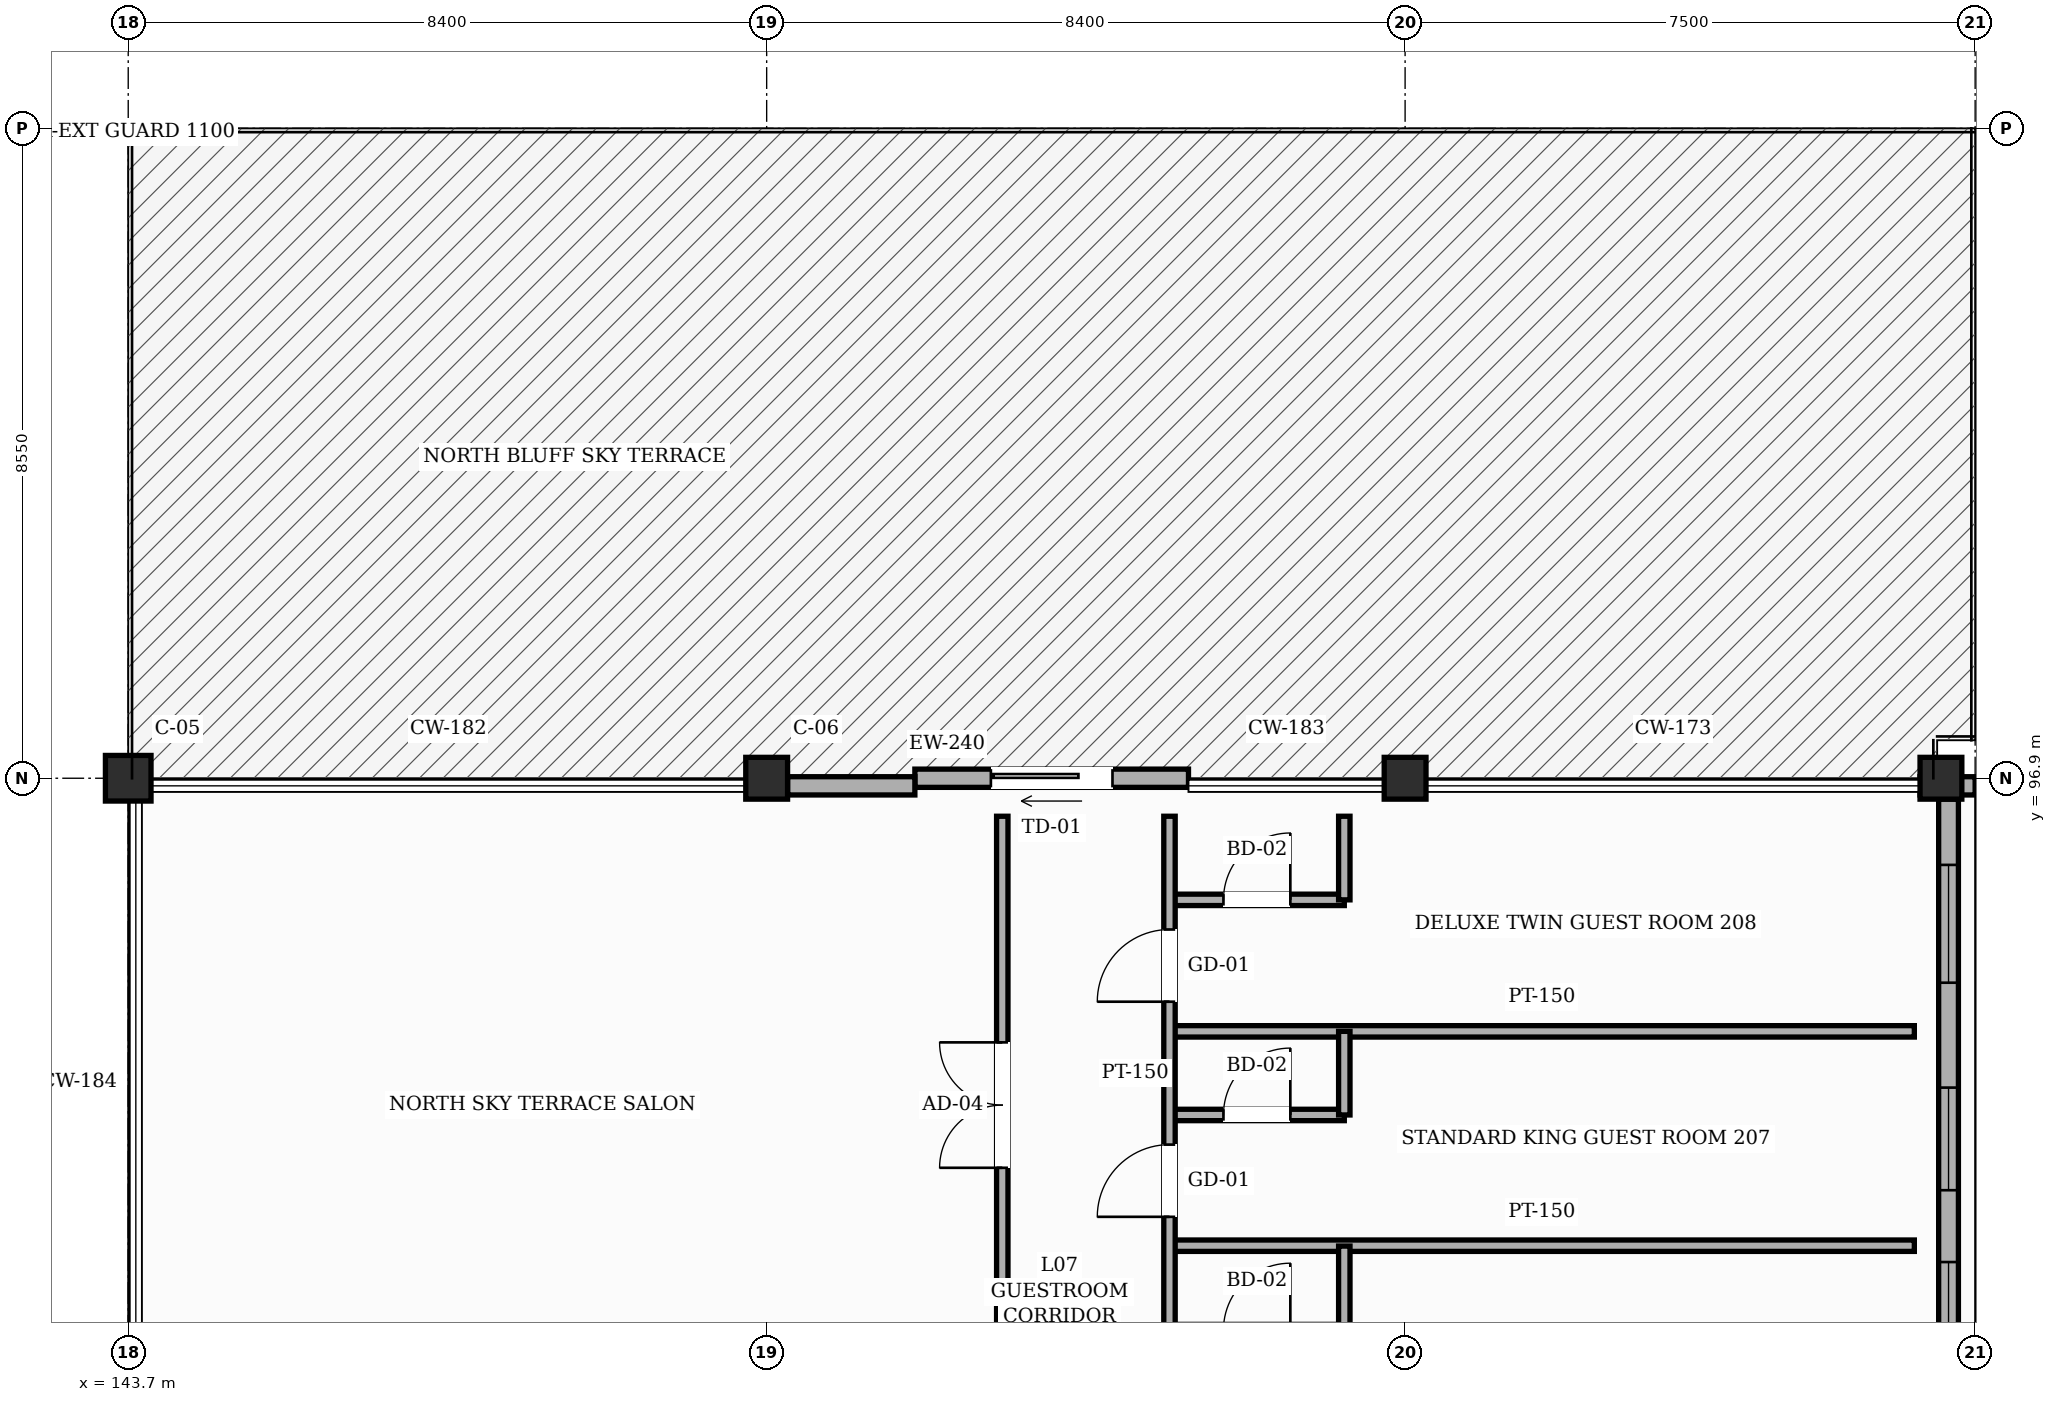
"""IFC4 building model, lengths in metres.
Left out: names, types, materials, properties, quantities, classifications, styles, units other than length and angle.
Written with IfcOpenShell. Run it as: python <this file> out.ifc"""

import sys

from ifc_helpers import new_model, si_unit, direction, frame, frame_2d, origin, origin_2d, place, context, subcontext, project, spatial, rectangle, hollow_rectangle, extrude, element, fill, save


model = new_model("IFC4")
c1 = context("Model", 3, precision=1e-05, world=origin(), true_north=direction((0.0, 1.0)))
c2 = subcontext(c1, "Body", "Model", "MODEL_VIEW")
j1 = project(units=[si_unit("LENGTHUNIT", "METRE"), si_unit("PLANEANGLEUNIT", "RADIAN")], contexts=[c1])
p1 = place(None, origin())
s1 = spatial("IfcSite", under=j1, at=p1, CompositionType="ELEMENT")
p2 = place(p1, origin())
s2 = spatial("IfcBuilding", under=s1, at=p2, CompositionType="ELEMENT")
p3 = place(p2, frame((0.0, 0.0, 31.8)))
s3 = spatial("IfcBuildingStorey", under=s2, at=p3, CompositionType="ELEMENT", Elevation=31.8)
p4 = place(p3, frame((143.7, 96.9, 0.0), z_axis=(0.0, 0.0, 1.0), x_axis=(1.0, 0.0, 0.0)))
e1 = element("IfcColumn", 1, at=p4, inside=s3, PredefinedType="COLUMN", context=c2, shape_type="SweptSolid", body=[
    extrude(hollow_rectangle(XDim=0.6, YDim=0.6, WallThickness=0.025, InnerFilletRadius=0.025, OuterFilletRadius=0.05, at=origin_2d()), origin(), (0.0, 0.0, 1.0), 3.6),
])
for number, where, z_axis, x_axis in (
    (2, (152.1, 96.9, 0.0), (0.0, 0.0, 1.0), (1.0, 0.0, 0.0)),
    (3, (160.5, 96.9, 0.0), (0.0, 0.0, 1.0), (1.0, 0.0, 0.0)),
    (4, (167.55, 96.9, 0.0), (0.0, 0.0, 1.0), (1.0, 0.0, 0.0)),
):
    element("IfcColumn", number, at=place(p3, frame(where, z_axis=z_axis, x_axis=x_axis)), inside=s3, PredefinedType="COLUMN", context=c2, shape_type="SweptSolid", body=[
        extrude(hollow_rectangle(XDim=0.55, YDim=0.55, WallThickness=0.022, InnerFilletRadius=0.022, OuterFilletRadius=0.044, at=origin_2d()), origin(), (0.0, 0.0, 1.0), 3.6),
    ])
p5 = place(p3, frame((167.65, 96.625, 0.0), z_axis=(0.0, 0.0, 1.0), x_axis=(0.0, -1.0, 0.0)))
e5 = element("IfcWall", 5, at=p5, inside=s3, PredefinedType="SOLIDWALL", context=c2, shape_type="SweptSolid", body=[
    extrude(rectangle(XDim=7.45, YDim=0.26, at=frame_2d((3.725, 0.0))), origin(), (0.0, 0.0, 1.0), 2.755),
])
p6 = place(p5, frame((6.09, 0.0, 0.85)))
e6 = element("IfcOpeningElement", 6, at=p6, cuts=e5, PredefinedType="OPENING", context=c2, shape_type="SweptSolid", body=[
    extrude(rectangle(XDim=1.15, YDim=1.35, at=frame_2d((0.575, 0.675))), frame((0.0, 0.14, 0.0), z_axis=(0.0, -1.0, 0.0), x_axis=(1.0, 0.0, 0.0)), (0.0, 0.0, 1.0), 0.28),
])
p7 = place(p5, frame((3.795, 0.0, 0.85)))
e7 = element("IfcOpeningElement", 7, at=p7, cuts=e5, PredefinedType="OPENING", context=c2, shape_type="SweptSolid", body=[
    extrude(rectangle(XDim=1.35, YDim=1.35, at=frame_2d((0.675, 0.675))), frame((0.0, 0.14, 0.0), z_axis=(0.0, -1.0, 0.0), x_axis=(1.0, 0.0, 0.0)), (0.0, 0.0, 1.0), 0.28),
])
p8 = place(p5, frame((0.865, 0.0, 0.85)))
e8 = element("IfcOpeningElement", 8, at=p8, cuts=e5, PredefinedType="OPENING", context=c2, shape_type="SweptSolid", body=[
    extrude(rectangle(XDim=1.55, YDim=1.35, at=frame_2d((0.775, 0.675))), frame((0.0, 0.14, 0.0), z_axis=(0.0, -1.0, 0.0), x_axis=(1.0, 0.0, 0.0)), (0.0, 0.0, 1.0), 0.28),
])
p9 = place(p3, frame((154.05, 96.9, 0.0), z_axis=(0.0, 0.0, 1.0), x_axis=(1.0, 0.0, 0.0)))
e9 = element("IfcWall", 9, at=p9, inside=s3, PredefinedType="SOLIDWALL", context=c2, shape_type="SweptSolid", body=[
    extrude(rectangle(XDim=3.6, YDim=0.24, at=frame_2d((1.8, 0.0))), origin(), (0.0, 0.0, 1.0), 2.755),
])
p10 = place(p9, frame((1.0, 0.0, 0.0)))
e10 = element("IfcOpeningElement", 10, at=p10, cuts=e9, PredefinedType="OPENING", context=c2, shape_type="SweptSolid", body=[
    extrude(rectangle(XDim=1.6, YDim=2.3, at=frame_2d((0.8, 1.15))), frame((0.0, 0.13, 0.0), z_axis=(0.0, -1.0, 0.0), x_axis=(1.0, 0.0, 0.0)), (0.0, 0.0, 1.0), 0.26),
])
p11 = place(p3, frame((152.375, 96.8, 0.0), z_axis=(0.0, 0.0, 1.0), x_axis=(1.0, 0.0, 0.0)))
e11 = element("IfcWall", 11, at=p11, inside=s3, PredefinedType="SOLIDWALL", context=c2, shape_type="SweptSolid", body=[
    extrude(rectangle(XDim=1.675, YDim=0.24, at=frame_2d((0.837, 0.0))), origin(), (0.0, 0.0, 1.0), 2.755),
])
p12 = place(p3, frame((167.275, 96.8, 0.0), z_axis=(0.0, 0.0, 1.0), x_axis=(1.0, 0.0, 0.0)))
e12 = element("IfcWall", 12, at=p12, inside=s3, PredefinedType="SOLIDWALL", context=c2, shape_type="SweptSolid", body=[
    extrude(rectangle(XDim=0.725, YDim=0.24, at=frame_2d((0.363, 0.0))), origin(), (0.0, 0.0, 1.0), 3.365),
])
p13 = place(p3, frame((157.4, 90.75, 0.0), z_axis=(0.0, 0.0, 1.0), x_axis=(1.0, 0.0, 0.0)))
e13 = element("IfcWall", 13, at=p13, inside=s3, PredefinedType="PARTITIONING", context=c2, shape_type="SweptSolid", body=[
    extrude(rectangle(XDim=9.8, YDim=0.15, at=frame_2d((4.9, 0.0))), origin(), (0.0, 0.0, 1.0), 3.365),
])
p14 = place(p3, frame((157.4, 92.47, 0.0), z_axis=(0.0, 0.0, 1.0), x_axis=(1.0, 0.0, 0.0)))
e14 = element("IfcWall", 14, at=p14, inside=s3, PredefinedType="PARTITIONING", context=c2, shape_type="SweptSolid", body=[
    extrude(rectangle(XDim=2.3, YDim=0.15, at=frame_2d((1.15, 0.0))), origin(), (0.0, 0.0, 1.0), 3.365),
])
p15 = place(p14, frame((0.71, 0.0, 0.0)))
e15 = element("IfcOpeningElement", 15, at=p15, cuts=e14, PredefinedType="OPENING", context=c2, shape_type="SweptSolid", body=[
    extrude(rectangle(XDim=0.88, YDim=2.12, at=frame_2d((0.44, 1.06))), frame((0.0, 0.085, 0.0), z_axis=(0.0, -1.0, 0.0), x_axis=(1.0, 0.0, 0.0)), (0.0, 0.0, 1.0), 0.17),
])
p16 = place(p3, frame((157.4, 93.57, 0.0), z_axis=(0.0, 0.0, 1.0), x_axis=(1.0, 0.0, 0.0)))
e16 = element("IfcWall", 16, at=p16, inside=s3, PredefinedType="PARTITIONING", context=c2, shape_type="SweptSolid", body=[
    extrude(rectangle(XDim=9.8, YDim=0.15, at=frame_2d((4.9, 0.0))), origin(), (0.0, 0.0, 1.0), 3.365),
])
p17 = place(p3, frame((157.4, 95.3, 0.0), z_axis=(0.0, 0.0, 1.0), x_axis=(1.0, 0.0, 0.0)))
e17 = element("IfcWall", 17, at=p17, inside=s3, PredefinedType="PARTITIONING", context=c2, shape_type="SweptSolid", body=[
    extrude(rectangle(XDim=2.3, YDim=0.15, at=frame_2d((1.15, 0.0))), origin(), (0.0, 0.0, 1.0), 3.365),
])
p18 = place(p17, frame((0.71, 0.0, 0.0)))
e18 = element("IfcOpeningElement", 18, at=p18, cuts=e17, PredefinedType="OPENING", context=c2, shape_type="SweptSolid", body=[
    extrude(rectangle(XDim=0.88, YDim=2.12, at=frame_2d((0.44, 1.06))), frame((0.0, 0.085, 0.0), z_axis=(0.0, -1.0, 0.0), x_axis=(1.0, 0.0, 0.0)), (0.0, 0.0, 1.0), 0.17),
])
p19 = place(p3, frame((155.2, 62.0, 0.0), z_axis=(0.0, 0.0, 1.0), x_axis=(0.0, 1.0, 0.0)))
e19 = element("IfcWall", 19, at=p19, inside=s3, PredefinedType="PARTITIONING", context=c2, shape_type="SweptSolid", body=[
    extrude(rectangle(XDim=34.4, YDim=0.15, at=frame_2d((17.2, 0.0))), origin(), (0.0, 0.0, 1.0), 3.365),
])
p20 = place(p19, frame((29.775, 0.0, 0.0)))
e20 = element("IfcOpeningElement", 20, at=p20, cuts=e19, PredefinedType="OPENING", context=c2, shape_type="SweptSolid", body=[
    extrude(rectangle(XDim=1.65, YDim=2.35, at=frame_2d((0.825, 1.175))), frame((0.0, 0.085, 0.0), z_axis=(0.0, -1.0, 0.0), x_axis=(1.0, 0.0, 0.0)), (0.0, 0.0, 1.0), 0.17),
])
p21 = place(p19, frame((0.4, 0.0, 0.0)))
e21 = element("IfcOpeningElement", 21, at=p21, cuts=e19, PredefinedType="OPENING", context=c2, shape_type="SweptSolid", body=[
    extrude(rectangle(XDim=0.95, YDim=2.15, at=frame_2d((0.475, 1.075))), frame((0.0, 0.085, 0.0), z_axis=(0.0, -1.0, 0.0), x_axis=(1.0, 0.0, 0.0)), (0.0, 0.0, 1.0), 0.17),
])
p22 = place(p19, frame((3.38, 0.0, 0.0)))
e22 = element("IfcOpeningElement", 22, at=p22, cuts=e19, PredefinedType="OPENING", context=c2, shape_type="SweptSolid", body=[
    extrude(rectangle(XDim=0.95, YDim=2.15, at=frame_2d((0.475, 1.075))), frame((0.0, 0.085, 0.0), z_axis=(0.0, -1.0, 0.0), x_axis=(1.0, 0.0, 0.0)), (0.0, 0.0, 1.0), 0.17),
])
p23 = place(p19, frame((6.355, 0.0, 0.0)))
e23 = element("IfcOpeningElement", 23, at=p23, cuts=e19, PredefinedType="OPENING", context=c2, shape_type="SweptSolid", body=[
    extrude(rectangle(XDim=0.95, YDim=2.15, at=frame_2d((0.475, 1.075))), frame((0.0, 0.085, 0.0), z_axis=(0.0, -1.0, 0.0), x_axis=(1.0, 0.0, 0.0)), (0.0, 0.0, 1.0), 0.17),
])
p24 = place(p19, frame((9.335, 0.0, 0.0)))
e24 = element("IfcOpeningElement", 24, at=p24, cuts=e19, PredefinedType="OPENING", context=c2, shape_type="SweptSolid", body=[
    extrude(rectangle(XDim=0.95, YDim=2.15, at=frame_2d((0.475, 1.075))), frame((0.0, 0.085, 0.0), z_axis=(0.0, -1.0, 0.0), x_axis=(1.0, 0.0, 0.0)), (0.0, 0.0, 1.0), 0.17),
])
p25 = place(p19, frame((12.31, 0.0, 0.0)))
e25 = element("IfcOpeningElement", 25, at=p25, cuts=e19, PredefinedType="OPENING", context=c2, shape_type="SweptSolid", body=[
    extrude(rectangle(XDim=0.95, YDim=2.15, at=frame_2d((0.475, 1.075))), frame((0.0, 0.085, 0.0), z_axis=(0.0, -1.0, 0.0), x_axis=(1.0, 0.0, 0.0)), (0.0, 0.0, 1.0), 0.17),
])
p26 = place(p19, frame((15.29, 0.0, 0.0)))
e26 = element("IfcOpeningElement", 26, at=p26, cuts=e19, PredefinedType="OPENING", context=c2, shape_type="SweptSolid", body=[
    extrude(rectangle(XDim=0.95, YDim=2.15, at=frame_2d((0.475, 1.075))), frame((0.0, 0.085, 0.0), z_axis=(0.0, -1.0, 0.0), x_axis=(1.0, 0.0, 0.0)), (0.0, 0.0, 1.0), 0.17),
])
p27 = place(p19, frame((18.265, 0.0, 0.0)))
e27 = element("IfcOpeningElement", 27, at=p27, cuts=e19, PredefinedType="OPENING", context=c2, shape_type="SweptSolid", body=[
    extrude(rectangle(XDim=0.95, YDim=2.15, at=frame_2d((0.475, 1.075))), frame((0.0, 0.085, 0.0), z_axis=(0.0, -1.0, 0.0), x_axis=(1.0, 0.0, 0.0)), (0.0, 0.0, 1.0), 0.17),
])
p28 = place(p19, frame((21.245, 0.0, 0.0)))
e28 = element("IfcOpeningElement", 28, at=p28, cuts=e19, PredefinedType="OPENING", context=c2, shape_type="SweptSolid", body=[
    extrude(rectangle(XDim=0.95, YDim=2.15, at=frame_2d((0.475, 1.075))), frame((0.0, 0.085, 0.0), z_axis=(0.0, -1.0, 0.0), x_axis=(1.0, 0.0, 0.0)), (0.0, 0.0, 1.0), 0.17),
])
p29 = place(p19, frame((24.22, 0.0, 0.0)))
e29 = element("IfcOpeningElement", 29, at=p29, cuts=e19, PredefinedType="OPENING", context=c2, shape_type="SweptSolid", body=[
    extrude(rectangle(XDim=0.95, YDim=2.15, at=frame_2d((0.475, 1.075))), frame((0.0, 0.085, 0.0), z_axis=(0.0, -1.0, 0.0), x_axis=(1.0, 0.0, 0.0)), (0.0, 0.0, 1.0), 0.17),
])
p30 = place(p3, frame((157.4, 76.6, 0.0), z_axis=(0.0, 0.0, 1.0), x_axis=(0.0, 1.0, 0.0)))
e30 = element("IfcWall", 30, at=p30, inside=s3, PredefinedType="PARTITIONING", context=c2, shape_type="SweptSolid", body=[
    extrude(rectangle(XDim=19.8, YDim=0.15, at=frame_2d((9.9, 0.0))), origin(), (0.0, 0.0, 1.0), 3.365),
])
p31 = place(p30, frame((0.39, 0.0, 0.0)))
e31 = element("IfcOpeningElement", 31, at=p31, cuts=e30, PredefinedType="OPENING", context=c2, shape_type="SweptSolid", body=[
    extrude(rectangle(XDim=0.95, YDim=2.15, at=frame_2d((0.475, 1.075))), frame((0.0, 0.085, 0.0), z_axis=(0.0, -1.0, 0.0), x_axis=(1.0, 0.0, 0.0)), (0.0, 0.0, 1.0), 0.17),
])
p32 = place(p30, frame((3.22, 0.0, 0.0)))
e32 = element("IfcOpeningElement", 32, at=p32, cuts=e30, PredefinedType="OPENING", context=c2, shape_type="SweptSolid", body=[
    extrude(rectangle(XDim=0.95, YDim=2.15, at=frame_2d((0.475, 1.075))), frame((0.0, 0.085, 0.0), z_axis=(0.0, -1.0, 0.0), x_axis=(1.0, 0.0, 0.0)), (0.0, 0.0, 1.0), 0.17),
])
p33 = place(p30, frame((6.045, 0.0, 0.0)))
e33 = element("IfcOpeningElement", 33, at=p33, cuts=e30, PredefinedType="OPENING", context=c2, shape_type="SweptSolid", body=[
    extrude(rectangle(XDim=0.95, YDim=2.15, at=frame_2d((0.475, 1.075))), frame((0.0, 0.085, 0.0), z_axis=(0.0, -1.0, 0.0), x_axis=(1.0, 0.0, 0.0)), (0.0, 0.0, 1.0), 0.17),
])
p34 = place(p30, frame((8.875, 0.0, 0.0)))
e34 = element("IfcOpeningElement", 34, at=p34, cuts=e30, PredefinedType="OPENING", context=c2, shape_type="SweptSolid", body=[
    extrude(rectangle(XDim=0.95, YDim=2.15, at=frame_2d((0.475, 1.075))), frame((0.0, 0.085, 0.0), z_axis=(0.0, -1.0, 0.0), x_axis=(1.0, 0.0, 0.0)), (0.0, 0.0, 1.0), 0.17),
])
p35 = place(p30, frame((11.705, 0.0, 0.0)))
e35 = element("IfcOpeningElement", 35, at=p35, cuts=e30, PredefinedType="OPENING", context=c2, shape_type="SweptSolid", body=[
    extrude(rectangle(XDim=0.95, YDim=2.15, at=frame_2d((0.475, 1.075))), frame((0.0, 0.085, 0.0), z_axis=(0.0, -1.0, 0.0), x_axis=(1.0, 0.0, 0.0)), (0.0, 0.0, 1.0), 0.17),
])
p36 = place(p30, frame((14.53, 0.0, 0.0)))
e36 = element("IfcOpeningElement", 36, at=p36, cuts=e30, PredefinedType="OPENING", context=c2, shape_type="SweptSolid", body=[
    extrude(rectangle(XDim=0.95, YDim=2.15, at=frame_2d((0.475, 1.075))), frame((0.0, 0.085, 0.0), z_axis=(0.0, -1.0, 0.0), x_axis=(1.0, 0.0, 0.0)), (0.0, 0.0, 1.0), 0.17),
])
p37 = place(p30, frame((17.36, 0.0, 0.0)))
e37 = element("IfcOpeningElement", 37, at=p37, cuts=e30, PredefinedType="OPENING", context=c2, shape_type="SweptSolid", body=[
    extrude(rectangle(XDim=0.95, YDim=2.15, at=frame_2d((0.475, 1.075))), frame((0.0, 0.085, 0.0), z_axis=(0.0, -1.0, 0.0), x_axis=(1.0, 0.0, 0.0)), (0.0, 0.0, 1.0), 0.17),
])
for number, where, z_axis, x_axis in (
    (38, (159.7, 89.645, 0.0), (0.0, 0.0, 1.0), (0.0, 1.0, 0.0)),
    (39, (159.7, 92.47, 0.0), (0.0, 0.0, 1.0), (0.0, 1.0, 0.0)),
):
    element("IfcWall", number, at=place(p3, frame(where, z_axis=z_axis, x_axis=x_axis)), inside=s3, PredefinedType="PARTITIONING", context=c2, shape_type="SweptSolid", body=[
        extrude(rectangle(XDim=1.1, YDim=0.15, at=frame_2d((0.55, 0.0))), origin(), (0.0, 0.0, 1.0), 3.365),
    ])
p38 = place(p3, frame((159.7, 95.3, 0.0), z_axis=(0.0, 0.0, 1.0), x_axis=(0.0, 1.0, 0.0)))
e40 = element("IfcWall", 40, at=p38, inside=s3, PredefinedType="PARTITIONING", context=c2, shape_type="SweptSolid", body=[
    extrude(rectangle(XDim=1.1, YDim=0.15, at=frame_2d((0.55, 0.0))), origin(), (0.0, 0.0, 1.0), 3.365),
])
p39 = place(p6, origin())
e41 = element("IfcWindow", 41, at=p39, inside=s3, PartitioningType="SINGLE_PANEL", PredefinedType="WINDOW", context=c2, shape_type="SweptSolid", body=[
    extrude(rectangle(XDim=1.15, YDim=1.35, at=frame_2d((0.575, 0.675))), frame((0.0, 0.03, 0.0), z_axis=(0.0, -1.0, 0.0), x_axis=(1.0, 0.0, 0.0)), (0.0, 0.0, 1.0), 0.06),
])
fill(e6, e41)
p40 = place(p7, origin())
e42 = element("IfcWindow", 42, at=p40, inside=s3, PartitioningType="SINGLE_PANEL", PredefinedType="WINDOW", context=c2, shape_type="SweptSolid", body=[
    extrude(rectangle(XDim=1.35, YDim=1.35, at=frame_2d((0.675, 0.675))), frame((0.0, 0.03, 0.0), z_axis=(0.0, -1.0, 0.0), x_axis=(1.0, 0.0, 0.0)), (0.0, 0.0, 1.0), 0.06),
])
fill(e7, e42)
p41 = place(p8, origin())
e43 = element("IfcWindow", 43, at=p41, inside=s3, PartitioningType="SINGLE_PANEL", PredefinedType="WINDOW", context=c2, shape_type="SweptSolid", body=[
    extrude(rectangle(XDim=1.55, YDim=1.35, at=frame_2d((0.775, 0.675))), frame((0.0, 0.03, 0.0), z_axis=(0.0, -1.0, 0.0), x_axis=(1.0, 0.0, 0.0)), (0.0, 0.0, 1.0), 0.06),
])
fill(e8, e43)
p42 = place(p10, origin())
e44 = element("IfcDoor", 44, at=p42, inside=s3, OperationType="SLIDING_TO_LEFT", PredefinedType="DOOR", context=c2, shape_type="SweptSolid", body=[
    extrude(rectangle(XDim=1.6, YDim=2.3, at=frame_2d((0.8, 1.15))), frame((0.0, 0.025, 0.0), z_axis=(0.0, -1.0, 0.0), x_axis=(1.0, 0.0, 0.0)), (0.0, 0.0, 1.0), 0.05),
])
fill(e10, e44)
p43 = place(p20, origin())
e45 = element("IfcDoor", 45, at=p43, inside=s3, OperationType="DOUBLE_DOOR_SINGLE_SWING", PredefinedType="DOOR", context=c2, shape_type="SweptSolid", body=[
    extrude(rectangle(XDim=1.65, YDim=2.35, at=frame_2d((0.825, 1.175))), frame((0.0, 0.025, 0.0), z_axis=(0.0, -1.0, 0.0), x_axis=(1.0, 0.0, 0.0)), (0.0, 0.0, 1.0), 0.05),
])
fill(e20, e45)
p44 = place(p36, origin())
e46 = element("IfcDoor", 46, at=p44, inside=s3, OperationType="SINGLE_SWING_LEFT", PredefinedType="DOOR", context=c2, shape_type="SweptSolid", body=[
    extrude(rectangle(XDim=0.95, YDim=2.15, at=frame_2d((0.475, 1.075))), frame((0.0, 0.025, 0.0), z_axis=(0.0, -1.0, 0.0), x_axis=(1.0, 0.0, 0.0)), (0.0, 0.0, 1.0), 0.05),
])
fill(e36, e46)
p45 = place(p15, origin())
e47 = element("IfcDoor", 47, at=p45, inside=s3, OperationType="SINGLE_SWING_RIGHT", PredefinedType="DOOR", context=c2, shape_type="SweptSolid", body=[
    extrude(rectangle(XDim=0.88, YDim=2.12, at=frame_2d((0.44, 1.06))), frame((0.0, 0.025, 0.0), z_axis=(0.0, -1.0, 0.0), x_axis=(1.0, 0.0, 0.0)), (0.0, 0.0, 1.0), 0.05),
])
fill(e15, e47)
p46 = place(p37, origin())
e48 = element("IfcDoor", 48, at=p46, inside=s3, OperationType="SINGLE_SWING_LEFT", PredefinedType="DOOR", context=c2, shape_type="SweptSolid", body=[
    extrude(rectangle(XDim=0.95, YDim=2.15, at=frame_2d((0.475, 1.075))), frame((0.0, 0.025, 0.0), z_axis=(0.0, -1.0, 0.0), x_axis=(1.0, 0.0, 0.0)), (0.0, 0.0, 1.0), 0.05),
])
fill(e37, e48)
p47 = place(p18, origin())
e49 = element("IfcDoor", 49, at=p47, inside=s3, OperationType="SINGLE_SWING_RIGHT", PredefinedType="DOOR", context=c2, shape_type="SweptSolid", body=[
    extrude(rectangle(XDim=0.88, YDim=2.12, at=frame_2d((0.44, 1.06))), frame((0.0, 0.025, 0.0), z_axis=(0.0, -1.0, 0.0), x_axis=(1.0, 0.0, 0.0)), (0.0, 0.0, 1.0), 0.05),
])
fill(e18, e49)
save(model, sys.argv[1])
